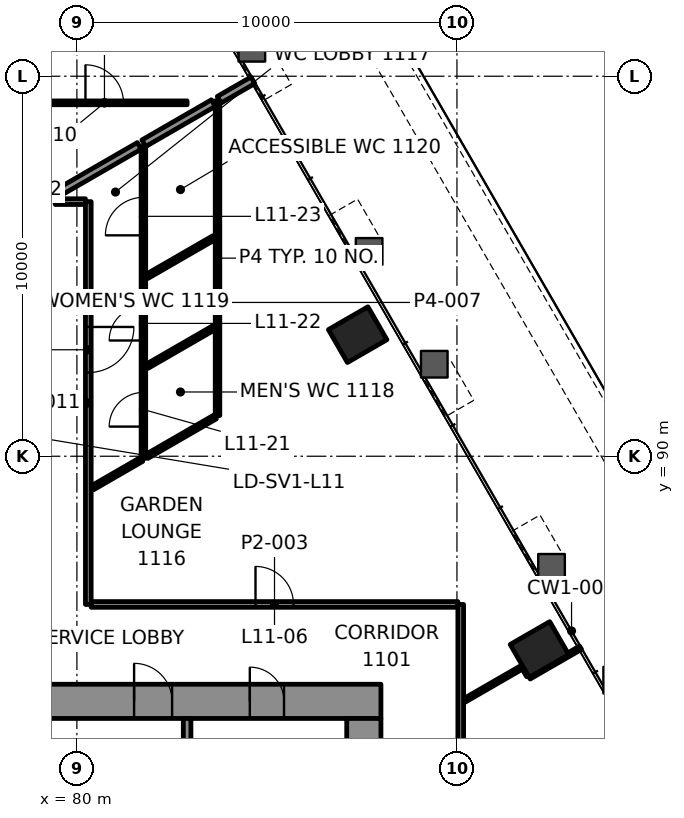
"""IFC4 building model, lengths in metres.
Left out: names, types, materials, properties, quantities, classifications, styles, units other than length and angle.
Written with IfcOpenShell. Run it as: python <this file> out.ifc"""

import sys

from ifc_helpers import new_model, si_unit, direction, frame, frame_2d, origin, origin_2d, place, context, subcontext, project, spatial, rectangle, extrude, element, fill, save


model = new_model("IFC4")
c1 = context("Model", 3, precision=1e-05, world=origin(), true_north=direction((0.0, 1.0)))
c2 = subcontext(c1, "Body", "Model", "MODEL_VIEW")
j1 = project(units=[si_unit("LENGTHUNIT", "METRE"), si_unit("PLANEANGLEUNIT", "RADIAN")], contexts=[c1])
p1 = place(None, origin())
s1 = spatial("IfcSite", under=j1, at=p1, CompositionType="ELEMENT")
p2 = place(p1, origin())
s2 = spatial("IfcBuilding", under=s1, at=p2, CompositionType="ELEMENT")
p3 = place(p2, frame((0.0, 0.0, 52.6)))
s3 = spatial("IfcBuildingStorey", under=s2, at=p3, CompositionType="ELEMENT", Elevation=52.6)
for number, where, z_axis, x_axis in (
    (1, (92.171, 84.914, -0.0), (0.0, 0.0, 1.0), (-0.5, 0.866, 0.0)),
    (2, (87.388, 93.199, -0.0), (0.0, 0.0, 1.0), (-0.5, 0.866, 0.0)),
):
    element("IfcColumn", number, at=place(p3, frame(where, z_axis=z_axis, x_axis=x_axis)), inside=s3, PredefinedType="COLUMN", context=c2, shape_type="SweptSolid", body=[
        extrude(rectangle(XDim=1.0, YDim=1.2, at=origin_2d()), origin(), (0.0, 0.0, 1.0), 4.2),
    ])
p4 = place(p3, frame((62.9, 83.55, 0.0), z_axis=(0.0, 0.0, 1.0), x_axis=(1.0, 0.0, 0.0)))
e3 = element("IfcWall", 3, at=p4, inside=s3, PredefinedType="SHEAR", context=c2, shape_type="SweptSolid", body=[
    extrude(rectangle(XDim=25.1, YDim=0.9, at=frame_2d((12.55, 0.0))), origin(), (0.0, 0.0, 1.0), 4.0),
])
p5 = place(p4, frame((4.795, 0.0, 0.0)))
e4 = element("IfcOpeningElement", 4, at=p5, cuts=e3, PredefinedType="OPENING", context=c2, shape_type="SweptSolid", body=[
    extrude(rectangle(XDim=1.0, YDim=2.1, at=frame_2d((0.5, 1.05))), frame((0.0, 0.46, 0.0), z_axis=(0.0, -1.0, 0.0), x_axis=(1.0, 0.0, 0.0)), (0.0, 0.0, 1.0), 0.92),
])
p6 = place(p4, frame((18.605, 0.0, 0.0)))
e5 = element("IfcOpeningElement", 5, at=p6, cuts=e3, PredefinedType="OPENING", context=c2, shape_type="SweptSolid", body=[
    extrude(rectangle(XDim=1.0, YDim=2.1, at=frame_2d((0.5, 1.05))), frame((0.0, 0.46, 0.0), z_axis=(0.0, -1.0, 0.0), x_axis=(1.0, 0.0, 0.0)), (0.0, 0.0, 1.0), 0.92),
])
p7 = place(p4, frame((2.55, 0.0, 0.0)))
e6 = element("IfcOpeningElement", 6, at=p7, cuts=e3, PredefinedType="OPENING", context=c2, shape_type="SweptSolid", body=[
    extrude(rectangle(XDim=0.9, YDim=2.1, at=frame_2d((0.45, 1.05))), frame((0.0, 0.46, 0.0), z_axis=(0.0, -1.0, 0.0), x_axis=(1.0, 0.0, 0.0)), (0.0, 0.0, 1.0), 0.92),
])
p8 = place(p4, frame((11.75, 0.0, 0.0)))
e7 = element("IfcOpeningElement", 7, at=p8, cuts=e3, PredefinedType="OPENING", context=c2, shape_type="SweptSolid", body=[
    extrude(rectangle(XDim=0.9, YDim=2.1, at=frame_2d((0.45, 1.05))), frame((0.0, 0.46, 0.0), z_axis=(0.0, -1.0, 0.0), x_axis=(1.0, 0.0, 0.0)), (0.0, 0.0, 1.0), 0.92),
])
p9 = place(p4, frame((21.65, 0.0, 0.0)))
e8 = element("IfcOpeningElement", 8, at=p9, cuts=e3, PredefinedType="OPENING", context=c2, shape_type="SweptSolid", body=[
    extrude(rectangle(XDim=0.9, YDim=2.1, at=frame_2d((0.45, 1.05))), frame((0.0, 0.46, 0.0), z_axis=(0.0, -1.0, 0.0), x_axis=(1.0, 0.0, 0.0)), (0.0, 0.0, 1.0), 0.92),
])
p10 = place(p3, frame((87.55, 66.9, 0.0), z_axis=(0.0, 0.0, 1.0), x_axis=(0.0, 1.0, 0.0)))
e9 = element("IfcWall", 9, at=p10, inside=s3, PredefinedType="SHEAR", context=c2, shape_type="SweptSolid", body=[
    extrude(rectangle(XDim=16.2, YDim=0.9, at=frame_2d((8.1, 0.0))), origin(), (0.0, 0.0, 1.0), 4.0),
])
p11 = place(p10, frame((5.5, 0.0, 0.0)))
e10 = element("IfcOpeningElement", 10, at=p11, cuts=e9, PredefinedType="OPENING", context=c2, shape_type="SweptSolid", body=[
    extrude(rectangle(XDim=1.8, YDim=2.1, at=frame_2d((0.9, 1.05))), frame((0.0, 0.46, 0.0), z_axis=(0.0, -1.0, 0.0), x_axis=(1.0, 0.0, 0.0)), (0.0, 0.0, 1.0), 0.92),
])
p12 = place(p10, frame((11.738, 0.0, 0.0)))
e11 = element("IfcOpeningElement", 11, at=p12, cuts=e9, PredefinedType="OPENING", context=c2, shape_type="SweptSolid", body=[
    extrude(rectangle(XDim=0.9, YDim=2.1, at=frame_2d((0.45, 1.05))), frame((0.0, 0.46, 0.0), z_axis=(0.0, -1.0, 0.0), x_axis=(1.0, 0.0, 0.0)), (0.0, 0.0, 1.0), 0.92),
])
p13 = place(p3, frame((80.375, 86.1, 0.0), z_axis=(0.0, 0.0, 1.0), x_axis=(1.0, 0.0, 0.0)))
e12 = element("IfcWall", 12, at=p13, inside=s3, PredefinedType="PARTITIONING", context=c2, shape_type="SweptSolid", body=[
    extrude(rectangle(XDim=9.649, YDim=0.15, at=frame_2d((4.825, 0.0))), origin(), (0.0, 0.0, 1.0), 3.4),
])
p14 = place(p13, frame((4.325, 0.0, 0.0)))
e13 = element("IfcOpeningElement", 13, at=p14, cuts=e12, PredefinedType="OPENING", context=c2, shape_type="SweptSolid", body=[
    extrude(rectangle(XDim=1.0, YDim=2.1, at=frame_2d((0.5, 1.05))), frame((0.0, 0.085, 0.0), z_axis=(0.0, -1.0, 0.0), x_axis=(1.0, 0.0, 0.0)), (0.0, 0.0, 1.0), 0.17),
])
p15 = place(p3, frame((78.551, 99.3, 0.0), z_axis=(0.0, 0.0, 1.0), x_axis=(1.0, 0.0, 0.0)))
e14 = element("IfcWall", 14, at=p15, inside=s3, PredefinedType="PARTITIONING", context=c2, shape_type="SweptSolid", body=[
    extrude(rectangle(XDim=4.349, YDim=0.1, at=frame_2d((2.175, 0.0))), origin(), (0.0, 0.0, 1.0), 3.4),
])
p16 = place(p15, frame((1.675, 0.0, 0.0)))
e15 = element("IfcOpeningElement", 15, at=p16, cuts=e14, PredefinedType="OPENING", context=c2, shape_type="SweptSolid", body=[
    extrude(rectangle(XDim=1.0, YDim=2.1, at=frame_2d((0.5, 1.05))), frame((0.0, 0.06, 0.0), z_axis=(0.0, -1.0, 0.0), x_axis=(1.0, 0.0, 0.0)), (0.0, 0.0, 1.0), 0.12),
])
p17 = place(p3, frame((91.902, 84.181, 0.0), z_axis=(0.0, 0.0, 1.0), x_axis=(0.866018739521, 0.500011542666, 0.0)))
e16 = element("IfcWall", 16, at=p17, inside=s3, PredefinedType="PARTITIONING", context=c2, shape_type="SweptSolid", body=[
    extrude(rectangle(XDim=1.56, YDim=0.1, at=frame_2d((0.78, 0.0))), origin(), (0.0, 0.0, 1.0), 3.165),
])
p18 = place(p3, frame((90.201, 83.577, 0.0), z_axis=(0.0, 0.0, 1.0), x_axis=(0.866016025414, 0.500016243463, 0.0)))
e17 = element("IfcWall", 17, at=p18, inside=s3, PredefinedType="PARTITIONING", context=c2, shape_type="SweptSolid", body=[
    extrude(rectangle(XDim=1.774, YDim=0.1, at=frame_2d((0.887, 0.0))), origin(), (0.0, 0.0, 1.0), 3.4),
])
p19 = place(p3, frame((80.41, 89.17, 0.0), z_axis=(0.0, 0.0, 1.0), x_axis=(0.866055123991, 0.49994851956, 0.0)))
e18 = element("IfcWall", 18, at=p19, inside=s3, PredefinedType="PARTITIONING", context=c2, shape_type="SweptSolid", body=[
    extrude(rectangle(XDim=1.496, YDim=0.12, at=frame_2d((0.748, 0.0))), origin(), (0.0, 0.0, 1.0), 3.4),
])
p20 = place(p3, frame((81.845, 92.366, 0.0), z_axis=(0.0, 0.0, 1.0), x_axis=(0.866069607179, 0.499923429657, 0.0)))
e19 = element("IfcWall", 19, at=p20, inside=s3, PredefinedType="PARTITIONING", context=c2, shape_type="SweptSolid", body=[
    extrude(rectangle(XDim=2.033, YDim=0.12, at=frame_2d((1.017, 0.0))), origin(), (0.0, 0.0, 1.0), 3.4),
])
p21 = place(p3, frame((81.845, 94.733, 0.0), z_axis=(0.0, 0.0, 1.0), x_axis=(0.866017611601, 0.500013496215, 0.0)))
e20 = element("IfcWall", 20, at=p21, inside=s3, PredefinedType="PARTITIONING", context=c2, shape_type="SweptSolid", body=[
    extrude(rectangle(XDim=2.033, YDim=0.12, at=frame_2d((1.017, 0.0))), origin(), (0.0, 0.0, 1.0), 3.4),
])
p22 = place(p3, frame((79.1, 96.7, 0.0), z_axis=(0.0, 0.0, 1.0), x_axis=(0.866031706645, 0.499989082967, 0.0)))
e21 = element("IfcWall", 21, at=p22, inside=s3, PredefinedType="PARTITIONING", context=c2, shape_type="SweptSolid", body=[
    extrude(rectangle(XDim=2.933, YDim=0.2, at=frame_2d((1.466, 0.0))), origin(), (0.0, 0.0, 1.0), 3.4),
])
p23 = place(p3, frame((90.1, 86.1, 0.0), z_axis=(0.0, 0.0, 1.0), x_axis=(0.0, -1.0, 0.0)))
e22 = element("IfcWall", 22, at=p23, inside=s3, PredefinedType="PARTITIONING", context=c2, shape_type="SweptSolid", body=[
    extrude(rectangle(XDim=18.778, YDim=0.15, at=frame_2d((9.389, 0.0))), origin(), (0.0, 0.0, 1.0), 3.4),
])
p24 = place(p23, frame((7.704, 0.0, 0.0)))
e23 = element("IfcOpeningElement", 23, at=p24, cuts=e22, PredefinedType="OPENING", context=c2, shape_type="SweptSolid", body=[
    extrude(rectangle(XDim=1.0, YDim=2.1, at=frame_2d((0.5, 1.05))), frame((0.0, 0.085, 0.0), z_axis=(0.0, -1.0, 0.0), x_axis=(1.0, 0.0, 0.0)), (0.0, 0.0, 1.0), 0.17),
])
p25 = place(p23, frame((15.701, 0.0, 0.0)))
e24 = element("IfcOpeningElement", 24, at=p25, cuts=e22, PredefinedType="OPENING", context=c2, shape_type="SweptSolid", body=[
    extrude(rectangle(XDim=1.0, YDim=2.1, at=frame_2d((0.5, 1.05))), frame((0.0, 0.085, 0.0), z_axis=(0.0, -1.0, 0.0), x_axis=(1.0, 0.0, 0.0)), (0.0, 0.0, 1.0), 0.17),
])
p26 = place(p3, frame((83.7, 91.07, 0.0), z_axis=(0.0, 0.0, 1.0), x_axis=(0.0, 1.0, 0.0)))
e25 = element("IfcWall", 25, at=p26, inside=s3, PredefinedType="PARTITIONING", context=c2, shape_type="SweptSolid", body=[
    extrude(rectangle(XDim=8.285, YDim=0.12, at=frame_2d((4.143, 0.0))), origin(), (0.0, 0.0, 1.0), 3.165),
])
p27 = place(p3, frame((81.75, 89.944, 0.0), z_axis=(0.0, 0.0, 1.0), x_axis=(0.0, 1.0, 0.0)))
e26 = element("IfcWall", 26, at=p27, inside=s3, PredefinedType="PARTITIONING", context=c2, shape_type="SweptSolid", body=[
    extrude(rectangle(XDim=8.206, YDim=0.12, at=frame_2d((4.103, 0.0))), origin(), (0.0, 0.0, 1.0), 3.4),
])
p28 = place(p27, frame((0.835, 0.0, 0.0)))
e27 = element("IfcOpeningElement", 27, at=p28, cuts=e26, PredefinedType="OPENING", context=c2, shape_type="SweptSolid", body=[
    extrude(rectangle(XDim=0.9, YDim=2.1, at=frame_2d((0.45, 1.05))), frame((0.0, 0.07, 0.0), z_axis=(0.0, -1.0, 0.0), x_axis=(1.0, 0.0, 0.0)), (0.0, 0.0, 1.0), 0.14),
])
p29 = place(p27, frame((3.101, 0.0, 0.0)))
e28 = element("IfcOpeningElement", 28, at=p29, cuts=e26, PredefinedType="OPENING", context=c2, shape_type="SweptSolid", body=[
    extrude(rectangle(XDim=0.9, YDim=2.1, at=frame_2d((0.45, 1.05))), frame((0.0, 0.07, 0.0), z_axis=(0.0, -1.0, 0.0), x_axis=(1.0, 0.0, 0.0)), (0.0, 0.0, 1.0), 0.14),
])
p30 = place(p27, frame((5.869, 0.0, 0.0)))
e29 = element("IfcOpeningElement", 29, at=p30, cuts=e26, PredefinedType="OPENING", context=c2, shape_type="SweptSolid", body=[
    extrude(rectangle(XDim=1.0, YDim=2.1, at=frame_2d((0.5, 1.05))), frame((0.0, 0.07, 0.0), z_axis=(0.0, -1.0, 0.0), x_axis=(1.0, 0.0, 0.0)), (0.0, 0.0, 1.0), 0.14),
])
p31 = place(p3, frame((80.3, 96.7, 0.0), z_axis=(0.0, 0.0, 1.0), x_axis=(0.0, -1.0, 0.0)))
e30 = element("IfcWall", 30, at=p31, inside=s3, PredefinedType="PARTITIONING", context=c2, shape_type="SweptSolid", body=[
    extrude(rectangle(XDim=10.6, YDim=0.15, at=frame_2d((5.3, 0.0))), origin(), (0.0, 0.0, 1.0), 3.4),
])
p32 = place(p31, frame((3.298, 0.0, 0.0)))
e31 = element("IfcOpeningElement", 31, at=p32, cuts=e30, PredefinedType="OPENING", context=c2, shape_type="SweptSolid", body=[
    extrude(rectangle(XDim=1.2, YDim=2.1, at=frame_2d((0.6, 1.05))), frame((0.0, 0.085, 0.0), z_axis=(0.0, -1.0, 0.0), x_axis=(1.0, 0.0, 0.0)), (0.0, 0.0, 1.0), 0.17),
])
p33 = place(p3, frame((91.877, 84.225, 0.0), z_axis=(0.0, 0.0, 1.0), x_axis=(-0.500313526201, 0.865844313662, 0.0)))
e32 = element("IfcWall", 32, at=p33, inside=s3, PredefinedType="PARTITIONING", context=c2, shape_type="SweptSolid", body=[
    extrude(rectangle(XDim=0.226, YDim=0.1, at=frame_2d((0.113, 0.0))), origin(), (0.0, 0.0, 1.0), 3.4),
])
p34 = place(p3, frame((79.429, 96.7, 0.0), z_axis=(0.0, 0.0, 1.0), x_axis=(1.0, 0.0, 0.0)))
e33 = element("IfcWall", 33, at=p34, inside=s3, PredefinedType="PARTITIONING", context=c2, shape_type="SweptSolid", body=[
    extrude(rectangle(XDim=0.796, YDim=0.15, at=frame_2d((0.398, 0.0))), origin(), (0.0, 0.0, 1.0), 3.4),
])
p35 = place(p3, frame((81.84, 89.996, 0.0), z_axis=(0.0, 0.0, 1.0), x_axis=(0.866015411258, 0.500017307165, 0.0)))
e34 = element("IfcWall", 34, at=p35, inside=s3, PredefinedType="PARTITIONING", context=c2, shape_type="SweptSolid", body=[
    extrude(rectangle(XDim=2.079, YDim=0.12, at=frame_2d((1.039, 0.0))), origin(), (0.0, 0.0, 1.0), 3.4),
])
p36 = place(p3, frame((83.745, 99.382, 0.0), z_axis=(0.0, 0.0, 1.0), x_axis=(0.866062461731, 0.499935808259, 0.0)))
e35 = element("IfcWall", 35, at=p36, inside=s3, PredefinedType="PARTITIONING", context=c2, shape_type="SweptSolid", body=[
    extrude(rectangle(XDim=1.024, YDim=0.2, at=frame_2d((0.512, 0.0))), origin(), (0.0, 0.0, 1.0), 3.165),
])
p37 = place(p3, frame((81.76, 98.236, 0.0), z_axis=(0.0, 0.0, 1.0), x_axis=(0.866037425094, 0.499979177903, 0.0)))
e36 = element("IfcWall", 36, at=p37, inside=s3, PredefinedType="PARTITIONING", context=c2, shape_type="SweptSolid", body=[
    extrude(rectangle(XDim=2.113, YDim=0.2, at=frame_2d((1.056, 0.0))), origin(), (0.0, 0.0, 1.0), 3.4),
])
p38 = place(p3, frame((110.994, 61.012, 0.0), z_axis=(0.0, 0.0, 1.0), x_axis=(-0.500000853759, 0.866024910866, 0.0)))
e37 = element("IfcWall", 37, at=p38, inside=s3, PredefinedType="SOLIDWALL", context=c2, shape_type="SweptSolid", body=[
    extrude(rectangle(XDim=60.222, YDim=0.8, at=frame_2d((30.111, 0.0))), origin(), (0.0, 0.0, 1.0), 0.9),
])
p39 = place(p3, frame((82.9, 81.28, 0.0), z_axis=(0.0, 0.0, 1.0), x_axis=(0.0, 1.0, 0.0)))
e38 = element("IfcWall", 38, at=p39, inside=s3, PredefinedType="PARTITIONING", context=c2, shape_type="SweptSolid", body=[
    extrude(rectangle(XDim=1.82, YDim=0.2, at=frame_2d((0.91, 0.0))), origin(), (0.0, 0.0, 1.0), 4.0),
])
p40 = place(p14, origin())
e39 = element("IfcDoor", 39, at=p40, inside=s3, OperationType="SINGLE_SWING_LEFT", PredefinedType="DOOR", context=c2, shape_type="SweptSolid", body=[
    extrude(rectangle(XDim=1.0, YDim=2.1, at=frame_2d((0.5, 1.05))), frame((0.0, 0.025, 0.0), z_axis=(0.0, -1.0, 0.0), x_axis=(1.0, 0.0, 0.0)), (0.0, 0.0, 1.0), 0.05),
])
fill(e13, e39)
p41 = place(p16, origin())
e40 = element("IfcDoor", 40, at=p41, inside=s3, OperationType="SINGLE_SWING_RIGHT", PredefinedType="DOOR", context=c2, shape_type="SweptSolid", body=[
    extrude(rectangle(XDim=1.0, YDim=2.1, at=frame_2d((0.5, 1.05))), frame((0.0, 0.025, 0.0), z_axis=(0.0, -1.0, 0.0), x_axis=(1.0, 0.0, 0.0)), (0.0, 0.0, 1.0), 0.05),
])
fill(e15, e40)
p42 = place(p28, origin())
e41 = element("IfcDoor", 41, at=p42, inside=s3, OperationType="SINGLE_SWING_LEFT", PredefinedType="DOOR", context=c2, shape_type="SweptSolid", body=[
    extrude(rectangle(XDim=0.9, YDim=2.1, at=frame_2d((0.45, 1.05))), frame((0.0, 0.025, 0.0), z_axis=(0.0, -1.0, 0.0), x_axis=(1.0, 0.0, 0.0)), (0.0, 0.0, 1.0), 0.05),
])
fill(e27, e41)
p43 = place(p29, origin())
e42 = element("IfcDoor", 42, at=p43, inside=s3, OperationType="SINGLE_SWING_RIGHT", PredefinedType="DOOR", context=c2, shape_type="SweptSolid", body=[
    extrude(rectangle(XDim=0.9, YDim=2.1, at=frame_2d((0.45, 1.05))), frame((0.0, 0.025, 0.0), z_axis=(0.0, -1.0, 0.0), x_axis=(1.0, 0.0, 0.0)), (0.0, 0.0, 1.0), 0.05),
])
fill(e28, e42)
p44 = place(p30, origin())
e43 = element("IfcDoor", 43, at=p44, inside=s3, OperationType="SINGLE_SWING_LEFT", PredefinedType="DOOR", context=c2, shape_type="SweptSolid", body=[
    extrude(rectangle(XDim=1.0, YDim=2.1, at=frame_2d((0.5, 1.05))), frame((0.0, 0.025, 0.0), z_axis=(0.0, -1.0, 0.0), x_axis=(1.0, 0.0, 0.0)), (0.0, 0.0, 1.0), 0.05),
])
fill(e29, e43)
p45 = place(p32, origin())
e44 = element("IfcDoor", 44, at=p45, inside=s3, OperationType="DOUBLE_DOOR_SINGLE_SWING", PredefinedType="DOOR", context=c2, shape_type="SweptSolid", body=[
    extrude(rectangle(XDim=1.2, YDim=2.1, at=frame_2d((0.6, 1.05))), frame((0.0, 0.025, 0.0), z_axis=(0.0, -1.0, 0.0), x_axis=(1.0, 0.0, 0.0)), (0.0, 0.0, 1.0), 0.05),
])
fill(e31, e44)
p46 = place(p6, origin())
e45 = element("IfcDoor", 45, at=p46, inside=s3, OperationType="SINGLE_SWING_LEFT", PredefinedType="DOOR", context=c2, shape_type="SweptSolid", body=[
    extrude(rectangle(XDim=1.0, YDim=2.1, at=frame_2d((0.5, 1.05))), frame((0.0, 0.17, 0.0), z_axis=(0.0, -1.0, 0.0), x_axis=(1.0, 0.0, 0.0)), (0.0, 0.0, 1.0), 0.34),
])
fill(e5, e45)
p47 = place(p9, origin())
e46 = element("IfcDoor", 46, at=p47, inside=s3, OperationType="SINGLE_SWING_LEFT", PredefinedType="DOOR", context=c2, shape_type="SweptSolid", body=[
    extrude(rectangle(XDim=0.9, YDim=2.1, at=frame_2d((0.45, 1.05))), frame((0.0, 0.17, 0.0), z_axis=(0.0, -1.0, 0.0), x_axis=(1.0, 0.0, 0.0)), (0.0, 0.0, 1.0), 0.34),
])
fill(e8, e46)
save(model, sys.argv[1])
